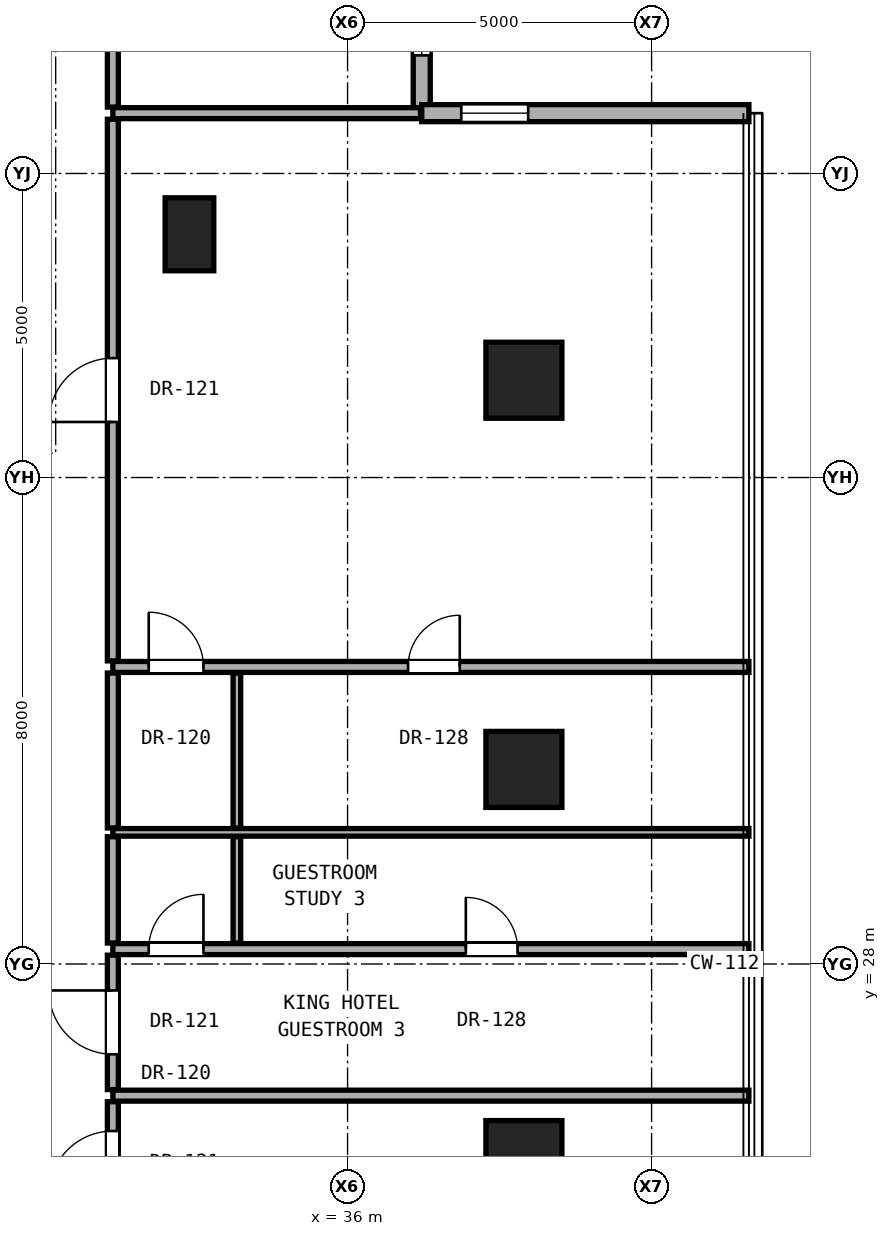
"""IFC4 building model, lengths in metres.
Left out: names, types, materials, properties, quantities, classifications, styles, units other than length and angle.
Written with IfcOpenShell. Run it as: python <this file> out.ifc"""

import sys

from ifc_helpers import new_model, si_unit, direction, frame, frame_2d, origin, origin_2d, place, context, subcontext, project, spatial, rectangle, hollow_rectangle, extrude, element, fill, save


model = new_model("IFC4")
c1 = context("Model", 3, precision=1e-05, world=origin(), true_north=direction((0.0, 1.0)))
c2 = subcontext(c1, "Body", "Model", "MODEL_VIEW")
j1 = project(units=[si_unit("LENGTHUNIT", "METRE"), si_unit("PLANEANGLEUNIT", "RADIAN")], contexts=[c1])
p1 = place(None, origin())
s1 = spatial("IfcSite", under=j1, at=p1, CompositionType="ELEMENT")
p2 = place(p1, origin())
s2 = spatial("IfcBuilding", under=s1, at=p2, CompositionType="ELEMENT")
p3 = place(p2, frame((0.0, 0.0, 35.6)))
s3 = spatial("IfcBuildingStorey", under=s2, at=p3, CompositionType="ELEMENT", Elevation=35.6)
for number, where, z_axis, x_axis in (
    (1, (38.9, 24.8, 0.0), (0.0, 0.0, 1.0), (1.0, 0.0, 0.0)),
    (2, (38.9, 31.2, 0.0), (0.0, 0.0, 1.0), (1.0, 0.0, 0.0)),
    (3, (38.9, 37.6, 0.0), (0.0, 0.0, 1.0), (1.0, 0.0, 0.0)),
):
    element("IfcColumn", number, at=place(p3, frame(where, z_axis=z_axis, x_axis=x_axis)), inside=s3, PredefinedType="COLUMN", context=c2, shape_type="SweptSolid", body=[
        extrude(hollow_rectangle(XDim=1.25, YDim=1.25, WallThickness=0.07, at=origin_2d()), origin(), (0.0, 0.0, 1.0), 3.3),
    ])
p4 = place(p3, frame((33.4, 40.0, 0.0), z_axis=(0.0, 0.0, 1.0), x_axis=(1.0, 0.0, 0.0)))
e4 = element("IfcColumn", 4, at=p4, inside=s3, PredefinedType="PILASTER", context=c2, shape_type="SweptSolid", body=[
    extrude(rectangle(XDim=0.8, YDim=1.2, at=origin_2d()), origin(), (0.0, 0.0, 1.0), 3.3),
])
p5 = place(p3, frame((37.22, 41.992, 0.0), z_axis=(0.0, 0.0, 1.0), x_axis=(0.0, 1.0, 0.0)))
e5 = element("IfcWall", 5, at=p5, inside=s3, PredefinedType="SOLIDWALL", context=c2, shape_type="SweptSolid", body=[
    extrude(rectangle(XDim=5.38, YDim=0.28, at=frame_2d((2.69, 0.0))), origin(), (0.0, 0.0, 1.0), 3.04),
])
p6 = place(p5, frame((0.95, 0.0, 0.85)))
e6 = element("IfcOpeningElement", 6, at=p6, cuts=e5, PredefinedType="OPENING", context=c2, shape_type="SweptSolid", body=[
    extrude(rectangle(XDim=1.1, YDim=2.0, at=frame_2d((0.55, 1.0))), frame((0.0, 0.15, 0.0), z_axis=(0.0, -1.0, 0.0), x_axis=(1.0, 0.0, 0.0)), (0.0, 0.0, 1.0), 0.3),
])
p7 = place(p3, frame((42.6, 41.992, 0.0), z_axis=(0.0, 0.0, 1.0), x_axis=(-1.0, 0.0, 0.0)))
e7 = element("IfcWall", 7, at=p7, inside=s3, PredefinedType="SOLIDWALL", context=c2, shape_type="SweptSolid", body=[
    extrude(rectangle(XDim=5.38, YDim=0.28, at=frame_2d((2.69, 0.0))), origin(), (0.0, 0.0, 1.0), 3.04),
])
p8 = place(p7, frame((3.63, 0.0, 0.85)))
e8 = element("IfcOpeningElement", 8, at=p8, cuts=e7, PredefinedType="OPENING", context=c2, shape_type="SweptSolid", body=[
    extrude(rectangle(XDim=1.1, YDim=2.0, at=frame_2d((0.55, 1.0))), frame((0.0, 0.15, 0.0), z_axis=(0.0, -1.0, 0.0), x_axis=(1.0, 0.0, 0.0)), (0.0, 0.0, 1.0), 0.3),
])
p9 = place(p3, frame((32.14, 25.835, 0.0), z_axis=(0.0, 0.0, 1.0), x_axis=(1.0, 0.0, 0.0)))
e9 = element("IfcWall", 9, at=p9, inside=s3, PredefinedType="PARTITIONING", context=c2, shape_type="SweptSolid", body=[
    extrude(rectangle(XDim=10.46, YDim=0.18, at=frame_2d((5.23, 0.0))), origin(), (0.0, 0.0, 1.0), 2.125),
])
p10 = place(p3, frame((32.14, 28.245, 0.0), z_axis=(0.0, 0.0, 1.0), x_axis=(1.0, 0.0, 0.0)))
e10 = element("IfcWall", 10, at=p10, inside=s3, PredefinedType="PARTITIONING", context=c2, shape_type="SweptSolid", body=[
    extrude(rectangle(XDim=10.46, YDim=0.18, at=frame_2d((5.23, 0.0))), origin(), (0.0, 0.0, 1.0), 2.125),
])
p11 = place(p10, frame((5.805, 0.0, 0.0)))
e11 = element("IfcOpeningElement", 11, at=p11, cuts=e10, PredefinedType="OPENING", context=c2, shape_type="SweptSolid", body=[
    extrude(rectangle(XDim=0.85, YDim=2.01, at=frame_2d((0.425, 1.005))), frame((0.0, 0.1, 0.0), z_axis=(0.0, -1.0, 0.0), x_axis=(1.0, 0.0, 0.0)), (0.0, 0.0, 1.0), 0.2),
])
p12 = place(p10, frame((0.59, 0.0, 0.0)))
e12 = element("IfcOpeningElement", 12, at=p12, cuts=e10, PredefinedType="OPENING", context=c2, shape_type="SweptSolid", body=[
    extrude(rectangle(XDim=0.9, YDim=2.1, at=frame_2d((0.45, 1.05))), frame((0.0, 0.1, 0.0), z_axis=(0.0, -1.0, 0.0), x_axis=(1.0, 0.0, 0.0)), (0.0, 0.0, 1.0), 0.2),
])
p13 = place(p3, frame((32.14, 30.165, 0.0), z_axis=(0.0, 0.0, 1.0), x_axis=(1.0, 0.0, 0.0)))
e13 = element("IfcWall", 13, at=p13, inside=s3, PredefinedType="PARTITIONING", context=c2, shape_type="SweptSolid", body=[
    extrude(rectangle(XDim=10.46, YDim=0.125, at=frame_2d((5.23, 0.0))), origin(), (0.0, 0.0, 1.0), 2.125),
])
p14 = place(p3, frame((32.14, 32.885, 0.0), z_axis=(0.0, 0.0, 1.0), x_axis=(1.0, 0.0, 0.0)))
e14 = element("IfcWall", 14, at=p14, inside=s3, PredefinedType="PARTITIONING", context=c2, shape_type="SweptSolid", body=[
    extrude(rectangle(XDim=10.46, YDim=0.18, at=frame_2d((5.23, 0.0))), origin(), (0.0, 0.0, 1.0), 2.125),
])
p15 = place(p14, frame((4.855, 0.0, 0.0)))
e15 = element("IfcOpeningElement", 15, at=p15, cuts=e14, PredefinedType="OPENING", context=c2, shape_type="SweptSolid", body=[
    extrude(rectangle(XDim=0.85, YDim=2.01, at=frame_2d((0.425, 1.005))), frame((0.0, 0.1, 0.0), z_axis=(0.0, -1.0, 0.0), x_axis=(1.0, 0.0, 0.0)), (0.0, 0.0, 1.0), 0.2),
])
p16 = place(p14, frame((0.59, 0.0, 0.0)))
e16 = element("IfcOpeningElement", 16, at=p16, cuts=e14, PredefinedType="OPENING", context=c2, shape_type="SweptSolid", body=[
    extrude(rectangle(XDim=0.9, YDim=2.1, at=frame_2d((0.45, 1.05))), frame((0.0, 0.1, 0.0), z_axis=(0.0, -1.0, 0.0), x_axis=(1.0, 0.0, 0.0)), (0.0, 0.0, 1.0), 0.2),
])
p17 = place(p3, frame((32.14, 41.992, 0.0), z_axis=(0.0, 0.0, 1.0), x_axis=(1.0, 0.0, 0.0)))
e17 = element("IfcWall", 17, at=p17, inside=s3, PredefinedType="PARTITIONING", context=c2, shape_type="SweptSolid", body=[
    extrude(rectangle(XDim=5.06, YDim=0.18, at=frame_2d((2.53, 0.0))), origin(), (0.0, 0.0, 1.0), 3.06),
])
p18 = place(p3, frame((32.14, 23.721, 0.0), z_axis=(0.0, 0.0, 1.0), x_axis=(0.0, 1.0, 0.0)))
e18 = element("IfcWall", 18, at=p18, inside=s3, PredefinedType="PARTITIONING", context=c2, shape_type="SweptSolid", body=[
    extrude(rectangle(XDim=2.014, YDim=0.18, at=frame_2d((1.007, 0.0))), origin(), (0.0, 0.0, 1.0), 2.279),
])
p19 = place(p18, frame((0.482, 0.0, 0.0)))
e19 = element("IfcOpeningElement", 19, at=p19, cuts=e18, PredefinedType="OPENING", context=c2, shape_type="SweptSolid", body=[
    extrude(rectangle(XDim=1.05, YDim=2.2, at=frame_2d((0.525, 1.1))), frame((0.0, 0.1, 0.0), z_axis=(0.0, -1.0, 0.0), x_axis=(1.0, 0.0, 0.0)), (0.0, 0.0, 1.0), 0.2),
])
p20 = place(p3, frame((32.14, 25.935, 0.0), z_axis=(0.0, 0.0, 1.0), x_axis=(0.0, 1.0, 0.0)))
e20 = element("IfcWall", 20, at=p20, inside=s3, PredefinedType="PARTITIONING", context=c2, shape_type="SweptSolid", body=[
    extrude(rectangle(XDim=2.21, YDim=0.18, at=frame_2d((1.105, 0.0))), origin(), (0.0, 0.0, 1.0), 3.06),
])
p21 = place(p20, frame((0.58, 0.0, 0.0)))
e21 = element("IfcOpeningElement", 21, at=p21, cuts=e20, PredefinedType="OPENING", context=c2, shape_type="SweptSolid", body=[
    extrude(rectangle(XDim=1.05, YDim=2.2, at=frame_2d((0.525, 1.1))), frame((0.0, 0.1, 0.0), z_axis=(0.0, -1.0, 0.0), x_axis=(1.0, 0.0, 0.0)), (0.0, 0.0, 1.0), 0.2),
])
p22 = place(p3, frame((32.14, 28.345, 0.0), z_axis=(0.0, 0.0, 1.0), x_axis=(0.0, 1.0, 0.0)))
e22 = element("IfcWall", 22, at=p22, inside=s3, PredefinedType="PARTITIONING", context=c2, shape_type="SweptSolid", body=[
    extrude(rectangle(XDim=1.748, YDim=0.18, at=frame_2d((0.874, 0.0))), origin(), (0.0, 0.0, 1.0), 3.06),
])
p23 = place(p3, frame((32.14, 30.238, 0.0), z_axis=(0.0, 0.0, 1.0), x_axis=(0.0, 1.0, 0.0)))
e23 = element("IfcWall", 23, at=p23, inside=s3, PredefinedType="PARTITIONING", context=c2, shape_type="SweptSolid", body=[
    extrude(rectangle(XDim=2.547, YDim=0.18, at=frame_2d((1.274, 0.0))), origin(), (0.0, 0.0, 1.0), 2.279),
])
p24 = place(p3, frame((32.14, 32.985, 0.0), z_axis=(0.0, 0.0, 1.0), x_axis=(0.0, 1.0, 0.0)))
e24 = element("IfcWall", 24, at=p24, inside=s3, PredefinedType="PARTITIONING", context=c2, shape_type="SweptSolid", body=[
    extrude(rectangle(XDim=8.907, YDim=0.18, at=frame_2d((4.454, 0.0))), origin(), (0.0, 0.0, 1.0), 2.436),
])
p25 = place(p24, frame((3.928, 0.0, 0.0)))
e25 = element("IfcOpeningElement", 25, at=p25, cuts=e24, PredefinedType="OPENING", context=c2, shape_type="SweptSolid", body=[
    extrude(rectangle(XDim=1.05, YDim=2.2, at=frame_2d((0.525, 1.1))), frame((0.0, 0.1, 0.0), z_axis=(0.0, -1.0, 0.0), x_axis=(1.0, 0.0, 0.0)), (0.0, 0.0, 1.0), 0.2),
])
p26 = place(p3, frame((32.14, 42.092, 0.0), z_axis=(0.0, 0.0, 1.0), x_axis=(0.0, 1.0, 0.0)))
e26 = element("IfcWall", 26, at=p26, inside=s3, PredefinedType="PARTITIONING", context=c2, shape_type="SweptSolid", body=[
    extrude(rectangle(XDim=5.28, YDim=0.18, at=frame_2d((2.64, 0.0))), origin(), (0.0, 0.0, 1.0), 3.06),
])
p27 = place(p26, frame((2.165, 0.0, 0.0)))
e27 = element("IfcOpeningElement", 27, at=p27, cuts=e26, PredefinedType="OPENING", context=c2, shape_type="SweptSolid", body=[
    extrude(rectangle(XDim=0.95, YDim=2.15, at=frame_2d((0.475, 1.075))), frame((0.0, 0.1, 0.0), z_axis=(0.0, -1.0, 0.0), x_axis=(1.0, 0.0, 0.0)), (0.0, 0.0, 1.0), 0.2),
])
p28 = place(p3, frame((34.18, 28.345, 0.0), z_axis=(0.0, 0.0, 1.0), x_axis=(0.0, 1.0, 0.0)))
e28 = element("IfcWall", 28, at=p28, inside=s3, PredefinedType="PARTITIONING", context=c2, shape_type="SweptSolid", body=[
    extrude(rectangle(XDim=1.748, YDim=0.125, at=frame_2d((0.874, 0.0))), origin(), (0.0, 0.0, 1.0), 3.06),
])
p29 = place(p3, frame((34.18, 30.238, 0.0), z_axis=(0.0, 0.0, 1.0), x_axis=(0.0, 1.0, 0.0)))
e29 = element("IfcWall", 29, at=p29, inside=s3, PredefinedType="PARTITIONING", context=c2, shape_type="SweptSolid", body=[
    extrude(rectangle(XDim=2.547, YDim=0.125, at=frame_2d((1.274, 0.0))), origin(), (0.0, 0.0, 1.0), 2.279),
])
p30 = place(p6, origin())
e30 = element("IfcWindow", 30, at=p30, inside=s3, PartitioningType="SINGLE_PANEL", PredefinedType="WINDOW", context=c2, shape_type="SweptSolid", body=[
    extrude(rectangle(XDim=1.1, YDim=2.0, at=frame_2d((0.55, 1.0))), frame((0.0, 0.03, 0.0), z_axis=(0.0, -1.0, 0.0), x_axis=(1.0, 0.0, 0.0)), (0.0, 0.0, 1.0), 0.06),
])
fill(e6, e30)
p31 = place(p8, origin())
e31 = element("IfcWindow", 31, at=p31, inside=s3, PartitioningType="SINGLE_PANEL", PredefinedType="WINDOW", context=c2, shape_type="SweptSolid", body=[
    extrude(rectangle(XDim=1.1, YDim=2.0, at=frame_2d((0.55, 1.0))), frame((0.0, 0.03, 0.0), z_axis=(0.0, -1.0, 0.0), x_axis=(1.0, 0.0, 0.0)), (0.0, 0.0, 1.0), 0.06),
])
fill(e8, e31)
p32 = place(p19, origin())
e32 = element("IfcDoor", 32, at=p32, inside=s3, OperationType="SINGLE_SWING_LEFT", PredefinedType="DOOR", context=c2, shape_type="SweptSolid", body=[
    extrude(rectangle(XDim=1.05, YDim=2.2, at=frame_2d((0.525, 1.1))), frame((0.0, 0.025, 0.0), z_axis=(0.0, -1.0, 0.0), x_axis=(1.0, 0.0, 0.0)), (0.0, 0.0, 1.0), 0.05),
])
fill(e19, e32)
p33 = place(p21, origin())
e33 = element("IfcDoor", 33, at=p33, inside=s3, OperationType="SINGLE_SWING_RIGHT", PredefinedType="DOOR", context=c2, shape_type="SweptSolid", body=[
    extrude(rectangle(XDim=1.05, YDim=2.2, at=frame_2d((0.525, 1.1))), frame((0.0, 0.025, 0.0), z_axis=(0.0, -1.0, 0.0), x_axis=(1.0, 0.0, 0.0)), (0.0, 0.0, 1.0), 0.05),
])
fill(e21, e33)
p34 = place(p11, origin())
e34 = element("IfcDoor", 34, at=p34, inside=s3, OperationType="SINGLE_SWING_LEFT", PredefinedType="DOOR", context=c2, shape_type="SweptSolid", body=[
    extrude(rectangle(XDim=0.85, YDim=2.01, at=frame_2d((0.425, 1.005))), frame((0.0, 0.025, 0.0), z_axis=(0.0, -1.0, 0.0), x_axis=(1.0, 0.0, 0.0)), (0.0, 0.0, 1.0), 0.05),
])
fill(e11, e34)
p35 = place(p12, origin())
e35 = element("IfcDoor", 35, at=p35, inside=s3, OperationType="SINGLE_SWING_RIGHT", PredefinedType="DOOR", context=c2, shape_type="SweptSolid", body=[
    extrude(rectangle(XDim=0.9, YDim=2.1, at=frame_2d((0.45, 1.05))), frame((0.0, 0.025, 0.0), z_axis=(0.0, -1.0, 0.0), x_axis=(1.0, 0.0, 0.0)), (0.0, 0.0, 1.0), 0.05),
])
fill(e12, e35)
p36 = place(p25, origin())
e36 = element("IfcDoor", 36, at=p36, inside=s3, OperationType="SINGLE_SWING_LEFT", PredefinedType="DOOR", context=c2, shape_type="SweptSolid", body=[
    extrude(rectangle(XDim=1.05, YDim=2.2, at=frame_2d((0.525, 1.1))), frame((0.0, 0.025, 0.0), z_axis=(0.0, -1.0, 0.0), x_axis=(1.0, 0.0, 0.0)), (0.0, 0.0, 1.0), 0.05),
])
fill(e25, e36)
p37 = place(p15, origin())
e37 = element("IfcDoor", 37, at=p37, inside=s3, OperationType="SINGLE_SWING_RIGHT", PredefinedType="DOOR", context=c2, shape_type="SweptSolid", body=[
    extrude(rectangle(XDim=0.85, YDim=2.01, at=frame_2d((0.425, 1.005))), frame((0.0, 0.025, 0.0), z_axis=(0.0, -1.0, 0.0), x_axis=(1.0, 0.0, 0.0)), (0.0, 0.0, 1.0), 0.05),
])
fill(e15, e37)
p38 = place(p16, origin())
e38 = element("IfcDoor", 38, at=p38, inside=s3, OperationType="SINGLE_SWING_LEFT", PredefinedType="DOOR", context=c2, shape_type="SweptSolid", body=[
    extrude(rectangle(XDim=0.9, YDim=2.1, at=frame_2d((0.45, 1.05))), frame((0.0, 0.025, 0.0), z_axis=(0.0, -1.0, 0.0), x_axis=(1.0, 0.0, 0.0)), (0.0, 0.0, 1.0), 0.05),
])
fill(e16, e38)
save(model, sys.argv[1])
